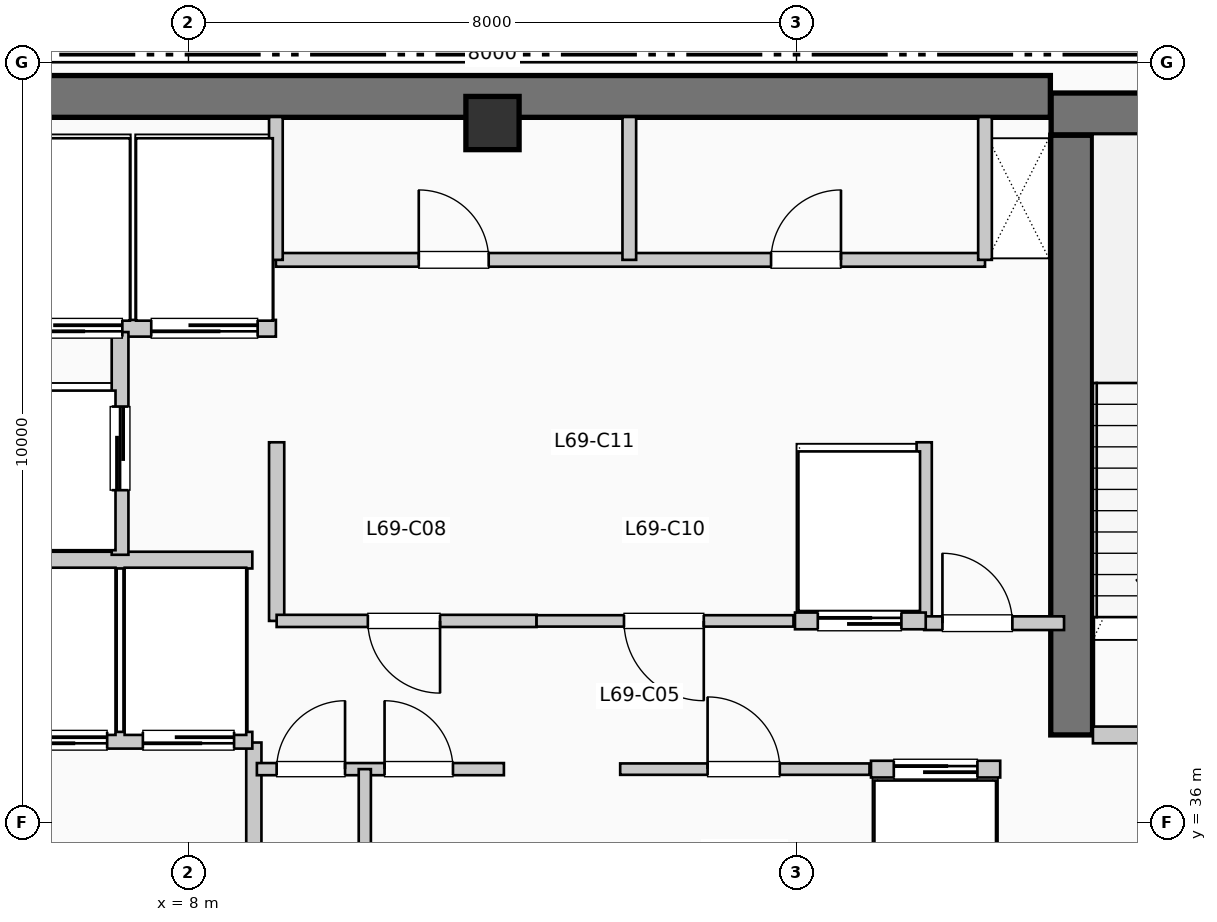
"""IFC4 building model, lengths in metres.
Left out: names, types, materials, properties, quantities, classifications, styles, units other than length and angle.
Written with IfcOpenShell. Run it as: python <this file> out.ifc"""

import sys

from ifc_helpers import new_model, si_unit, direction, frame, frame_2d, origin, origin_2d, place, context, subcontext, project, spatial, rectangle, extrude, element, fill, save


model = new_model("IFC4")
c1 = context("Model", 3, precision=1e-05, world=origin(), true_north=direction((0.0, 1.0)))
c2 = subcontext(c1, "Body", "Model", "MODEL_VIEW")
j1 = project(units=[si_unit("LENGTHUNIT", "METRE"), si_unit("PLANEANGLEUNIT", "RADIAN")], contexts=[c1])
p1 = place(None, origin())
s1 = spatial("IfcSite", under=j1, at=p1, CompositionType="ELEMENT")
p2 = place(p1, origin())
s2 = spatial("IfcBuilding", under=s1, at=p2, CompositionType="ELEMENT")
p3 = place(p2, frame((0.0, 0.0, 284.13)))
s3 = spatial("IfcBuildingStorey", under=s2, at=p3, CompositionType="ELEMENT", Elevation=284.13)
p4 = place(p3, frame((5.36, 45.55, 0.0), z_axis=(0.0, 0.0, 1.0), x_axis=(1.0, 0.0, 0.0)))
e1 = element("IfcWall", 1, at=p4, inside=s3, PredefinedType="SHEAR", context=c2, shape_type="SweptSolid", body=[
    extrude(rectangle(XDim=13.98, YDim=0.55, at=frame_2d((6.99, 0.0))), origin(), (0.0, 0.0, 1.0), 3.96),
])
p5 = place(p3, frame((19.62, 37.15, 0.0), z_axis=(0.0, 0.0, 1.0), x_axis=(0.0, 1.0, 0.0)))
e2 = element("IfcWall", 2, at=p5, inside=s3, PredefinedType="SHEAR", context=c2, shape_type="SweptSolid", body=[
    extrude(rectangle(XDim=7.89, YDim=0.55, at=frame_2d((3.945, 0.0))), origin(), (0.0, 0.0, 1.0), 3.96),
])
p6 = place(p3, frame((19.35, 45.32, 0.0), z_axis=(0.0, 0.0, 1.0), x_axis=(1.0, 0.0, 0.0)))
e3 = element("IfcWall", 3, at=p6, inside=s3, PredefinedType="SHEAR", context=c2, shape_type="SweptSolid", body=[
    extrude(rectangle(XDim=3.69, YDim=0.55, at=frame_2d((1.845, 0.0))), origin(), (0.0, 0.0, 1.0), 3.96),
])
p7 = place(p6, frame((1.15, 0.0, 1.05)))
e4 = element("IfcOpeningElement", 4, at=p7, cuts=e3, PredefinedType="OPENING", context=c2, shape_type="SweptSolid", body=[
    extrude(rectangle(XDim=1.4, YDim=1.8, at=frame_2d((0.7, 0.9))), frame((0.0, 0.285, 0.0), z_axis=(0.0, -1.0, 0.0), x_axis=(1.0, 0.0, 0.0)), (0.0, 0.0, 1.0), 0.57),
])
p8 = place(p3, frame((12.0, 45.2, 0.0), z_axis=(0.0, 0.0, 1.0), x_axis=(1.0, 0.0, 0.0)))
e5 = element("IfcColumn", 5, at=p8, inside=s3, PredefinedType="COLUMN", context=c2, shape_type="SweptSolid", body=[
    extrude(rectangle(XDim=0.7, YDim=0.7, at=origin_2d()), origin(), (0.0, 0.0, 1.0), 3.96),
])
p9 = place(p3, frame((8.86, 34.55, 0.0), z_axis=(0.0, 0.0, 1.0), x_axis=(0.0, 1.0, 0.0)))
e6 = element("IfcWall", 6, at=p9, inside=s3, PredefinedType="PARTITIONING", context=c2, shape_type="SweptSolid", body=[
    extrude(rectangle(XDim=2.5, YDim=0.2, at=frame_2d((1.25, 0.0))), origin(), (0.0, 0.0, 1.0), 3.74),
])
p10 = place(p3, frame((19.9, 37.15, 0.0), z_axis=(0.0, 0.0, 1.0), x_axis=(1.0, 0.0, 0.0)))
e7 = element("IfcWall", 7, at=p10, inside=s3, PredefinedType="PARTITIONING", context=c2, shape_type="SweptSolid", body=[
    extrude(rectangle(XDim=3.15, YDim=0.22, at=frame_2d((1.575, 0.0))), origin(), (0.0, 0.0, 1.0), 3.74),
])
p11 = place(p10, frame((2.05, 0.0, 0.0), z_axis=(0.0, 0.0, 1.0), x_axis=(-1.0, 0.0, 0.0)))
e8 = element("IfcOpeningElement", 8, at=p11, cuts=e7, PredefinedType="OPENING", context=c2, shape_type="SweptSolid", body=[
    extrude(rectangle(XDim=1.05, YDim=2.15, at=frame_2d((0.525, 1.075))), frame((0.0, 0.12, 0.0), z_axis=(0.0, -1.0, 0.0), x_axis=(1.0, 0.0, 0.0)), (0.0, 0.0, 1.0), 0.24),
])
p12 = place(p3, frame((5.38, 37.08, 0.0), z_axis=(0.0, 0.0, 1.0), x_axis=(1.0, 0.0, 0.0)))
e9 = element("IfcWall", 9, at=p12, inside=s3, PredefinedType="PARTITIONING", context=c2, shape_type="SweptSolid", body=[
    extrude(rectangle(XDim=3.46, YDim=0.22, at=frame_2d((1.73, 0.0))), origin(), (0.0, 0.0, 1.0), 3.74),
])
p13 = place(p12, frame((1.55, 0.0, 0.0), z_axis=(0.0, 0.0, 1.0), x_axis=(-1.0, 0.0, 0.0)))
e10 = element("IfcOpeningElement", 10, at=p13, cuts=e9, PredefinedType="OPENING", context=c2, shape_type="SweptSolid", body=[
    extrude(rectangle(XDim=1.2, YDim=2.2, at=frame_2d((0.6, 1.1))), frame((0.0, 0.12, 0.0), z_axis=(0.0, -1.0, 0.0), x_axis=(1.0, 0.0, 0.0)), (0.0, 0.0, 1.0), 0.24),
])
p14 = place(p12, frame((3.22, 0.0, 0.0), z_axis=(0.0, 0.0, 1.0), x_axis=(-1.0, 0.0, 0.0)))
e11 = element("IfcOpeningElement", 11, at=p14, cuts=e9, PredefinedType="OPENING", context=c2, shape_type="SweptSolid", body=[
    extrude(rectangle(XDim=1.2, YDim=2.2, at=frame_2d((0.6, 1.1))), frame((0.0, 0.12, 0.0), z_axis=(0.0, -1.0, 0.0), x_axis=(1.0, 0.0, 0.0)), (0.0, 0.0, 1.0), 0.24),
])
p15 = place(p3, frame((5.38, 39.45, 0.0), z_axis=(0.0, 0.0, 1.0), x_axis=(1.0, 0.0, 0.0)))
e12 = element("IfcWall", 12, at=p15, inside=s3, PredefinedType="PARTITIONING", context=c2, shape_type="SweptSolid", body=[
    extrude(rectangle(XDim=3.46, YDim=0.22, at=frame_2d((1.73, 0.0))), origin(), (0.0, 0.0, 1.0), 3.74),
])
p16 = place(p3, frame((5.38, 42.5, 0.0), z_axis=(0.0, 0.0, 1.0), x_axis=(1.0, 0.0, 0.0)))
e13 = element("IfcWall", 13, at=p16, inside=s3, PredefinedType="PARTITIONING", context=c2, shape_type="SweptSolid", body=[
    extrude(rectangle(XDim=3.77, YDim=0.22, at=frame_2d((1.885, 0.0))), origin(), (0.0, 0.0, 1.0), 3.74),
])
p17 = place(p16, frame((1.75, 0.0, 0.0), z_axis=(0.0, 0.0, 1.0), x_axis=(-1.0, 0.0, 0.0)))
e14 = element("IfcOpeningElement", 14, at=p17, cuts=e13, PredefinedType="OPENING", context=c2, shape_type="SweptSolid", body=[
    extrude(rectangle(XDim=1.4, YDim=2.2, at=frame_2d((0.7, 1.1))), frame((0.0, 0.12, 0.0), z_axis=(0.0, -1.0, 0.0), x_axis=(1.0, 0.0, 0.0)), (0.0, 0.0, 1.0), 0.24),
])
p18 = place(p16, frame((3.53, 0.0, 0.0), z_axis=(0.0, 0.0, 1.0), x_axis=(-1.0, 0.0, 0.0)))
e15 = element("IfcOpeningElement", 15, at=p18, cuts=e13, PredefinedType="OPENING", context=c2, shape_type="SweptSolid", body=[
    extrude(rectangle(XDim=1.4, YDim=2.2, at=frame_2d((0.7, 1.1))), frame((0.0, 0.12, 0.0), z_axis=(0.0, -1.0, 0.0), x_axis=(1.0, 0.0, 0.0)), (0.0, 0.0, 1.0), 0.24),
])
p19 = place(p3, frame((7.1, 39.52, 0.0), z_axis=(0.0, 0.0, 1.0), x_axis=(0.0, 1.0, 0.0)))
e16 = element("IfcWall", 16, at=p19, inside=s3, PredefinedType="PARTITIONING", context=c2, shape_type="SweptSolid", body=[
    extrude(rectangle(XDim=2.93, YDim=0.22, at=frame_2d((1.465, 0.0))), origin(), (0.0, 0.0, 1.0), 3.74),
])
p20 = place(p19, frame((0.85, 0.0, 0.0)))
e17 = element("IfcOpeningElement", 17, at=p20, cuts=e16, PredefinedType="OPENING", context=c2, shape_type="SweptSolid", body=[
    extrude(rectangle(XDim=1.1, YDim=2.2, at=frame_2d((0.55, 1.1))), frame((0.0, 0.12, 0.0), z_axis=(0.0, -1.0, 0.0), x_axis=(1.0, 0.0, 0.0)), (0.0, 0.0, 1.0), 0.24),
])
for number, where, z_axis, x_axis in (
    (18, (9.16, 38.65, 0.0), (0.0, 0.0, 1.0), (0.0, 1.0, 0.0)),
    (19, (17.68, 38.65, 0.0), (0.0, 0.0, 1.0), (0.0, 1.0, 0.0)),
):
    element("IfcWall", number, at=place(p3, frame(where, z_axis=z_axis, x_axis=x_axis)), inside=s3, PredefinedType="PARTITIONING", context=c2, shape_type="SweptSolid", body=[
        extrude(rectangle(XDim=2.35, YDim=0.2, at=frame_2d((1.175, 0.0))), origin(), (0.0, 0.0, 1.0), 3.74),
    ])
p21 = place(p3, frame((17.68, 38.62, 0.0), z_axis=(0.0, 0.0, 1.0), x_axis=(1.0, 0.0, 0.0)))
e20 = element("IfcWall", 20, at=p21, inside=s3, PredefinedType="PARTITIONING", context=c2, shape_type="SweptSolid", body=[
    extrude(rectangle(XDim=1.84, YDim=0.18, at=frame_2d((0.92, 0.0))), origin(), (0.0, 0.0, 1.0), 3.74),
])
p22 = place(p21, frame((0.24, 0.0, 0.0)))
e21 = element("IfcOpeningElement", 21, at=p22, cuts=e20, PredefinedType="OPENING", context=c2, shape_type="SweptSolid", body=[
    extrude(rectangle(XDim=0.92, YDim=2.1, at=frame_2d((0.46, 1.05))), frame((0.0, 0.1, 0.0), z_axis=(0.0, -1.0, 0.0), x_axis=(1.0, 0.0, 0.0)), (0.0, 0.0, 1.0), 0.2),
])
p23 = place(p3, frame((8.9, 36.7, 0.0), z_axis=(0.0, 0.0, 1.0), x_axis=(1.0, 0.0, 0.0)))
e22 = element("IfcWall", 22, at=p23, inside=s3, PredefinedType="PARTITIONING", context=c2, shape_type="SweptSolid", body=[
    extrude(rectangle(XDim=3.25, YDim=0.16, at=frame_2d((1.625, 0.0))), origin(), (0.0, 0.0, 1.0), 3.74),
])
p24 = place(p23, frame((0.26, 0.0, 0.0)))
e23 = element("IfcOpeningElement", 23, at=p24, cuts=e22, PredefinedType="OPENING", context=c2, shape_type="SweptSolid", body=[
    extrude(rectangle(XDim=0.9, YDim=2.15, at=frame_2d((0.45, 1.075))), frame((0.0, 0.09, 0.0), z_axis=(0.0, -1.0, 0.0), x_axis=(1.0, 0.0, 0.0)), (0.0, 0.0, 1.0), 0.18),
])
p25 = place(p23, frame((1.68, 0.0, 0.0)))
e24 = element("IfcOpeningElement", 24, at=p25, cuts=e22, PredefinedType="OPENING", context=c2, shape_type="SweptSolid", body=[
    extrude(rectangle(XDim=0.9, YDim=2.15, at=frame_2d((0.45, 1.075))), frame((0.0, 0.09, 0.0), z_axis=(0.0, -1.0, 0.0), x_axis=(1.0, 0.0, 0.0)), (0.0, 0.0, 1.0), 0.18),
])
p26 = place(p3, frame((10.32, 34.55, 0.0), z_axis=(0.0, 0.0, 1.0), x_axis=(0.0, 1.0, 0.0)))
e25 = element("IfcWall", 25, at=p26, inside=s3, PredefinedType="PARTITIONING", context=c2, shape_type="SweptSolid", body=[
    extrude(rectangle(XDim=2.15, YDim=0.16, at=frame_2d((1.075, 0.0))), origin(), (0.0, 0.0, 1.0), 3.74),
])
p27 = place(p3, frame((9.16, 38.65, 0.0), z_axis=(0.0, 0.0, 1.0), x_axis=(1.0, 0.0, 0.0)))
e26 = element("IfcWall", 26, at=p27, inside=s3, PredefinedType="PARTITIONING", context=c2, shape_type="SweptSolid", body=[
    extrude(rectangle(XDim=3.42, YDim=0.16, at=frame_2d((1.71, 0.0))), origin(), (0.0, 0.0, 1.0), 3.74),
])
p28 = place(p27, frame((2.15, 0.0, 0.0), z_axis=(0.0, 0.0, 1.0), x_axis=(-1.0, 0.0, 0.0)))
e27 = element("IfcOpeningElement", 27, at=p28, cuts=e26, PredefinedType="OPENING", context=c2, shape_type="SweptSolid", body=[
    extrude(rectangle(XDim=0.95, YDim=2.15, at=frame_2d((0.475, 1.075))), frame((0.0, 0.09, 0.0), z_axis=(0.0, -1.0, 0.0), x_axis=(1.0, 0.0, 0.0)), (0.0, 0.0, 1.0), 0.18),
])
p29 = place(p3, frame((13.68, 36.7, 0.0), z_axis=(0.0, 0.0, 1.0), x_axis=(1.0, 0.0, 0.0)))
e28 = element("IfcWall", 28, at=p29, inside=s3, PredefinedType="PARTITIONING", context=c2, shape_type="SweptSolid", body=[
    extrude(rectangle(XDim=3.28, YDim=0.15, at=frame_2d((1.64, 0.0))), origin(), (0.0, 0.0, 1.0), 3.74),
])
p30 = place(p29, frame((1.15, 0.0, 0.0)))
e29 = element("IfcOpeningElement", 29, at=p30, cuts=e28, PredefinedType="OPENING", context=c2, shape_type="SweptSolid", body=[
    extrude(rectangle(XDim=0.95, YDim=2.15, at=frame_2d((0.475, 1.075))), frame((0.0, 0.085, 0.0), z_axis=(0.0, -1.0, 0.0), x_axis=(1.0, 0.0, 0.0)), (0.0, 0.0, 1.0), 0.17),
])
p31 = place(p3, frame((12.58, 38.65, 0.0), z_axis=(0.0, 0.0, 1.0), x_axis=(1.0, 0.0, 0.0)))
e30 = element("IfcWall", 30, at=p31, inside=s3, PredefinedType="PARTITIONING", context=c2, shape_type="SweptSolid", body=[
    extrude(rectangle(XDim=3.38, YDim=0.15, at=frame_2d((1.69, 0.0))), origin(), (0.0, 0.0, 1.0), 3.74),
])
p32 = place(p31, frame((2.2, 0.0, 0.0), z_axis=(0.0, 0.0, 1.0), x_axis=(-1.0, 0.0, 0.0)))
e31 = element("IfcOpeningElement", 31, at=p32, cuts=e30, PredefinedType="OPENING", context=c2, shape_type="SweptSolid", body=[
    extrude(rectangle(XDim=1.05, YDim=2.15, at=frame_2d((0.525, 1.075))), frame((0.0, 0.085, 0.0), z_axis=(0.0, -1.0, 0.0), x_axis=(1.0, 0.0, 0.0)), (0.0, 0.0, 1.0), 0.17),
])
p33 = place(p3, frame((16.98, 36.7, 0.0), z_axis=(0.0, 0.0, 1.0), x_axis=(1.0, 0.0, 0.0)))
e32 = element("IfcWall", 32, at=p33, inside=s3, PredefinedType="PARTITIONING", context=c2, shape_type="SweptSolid", body=[
    extrude(rectangle(XDim=1.7, YDim=0.22, at=frame_2d((0.85, 0.0))), origin(), (0.0, 0.0, 1.0), 3.74),
])
p34 = place(p33, frame((0.3, 0.0, 0.0)))
e33 = element("IfcOpeningElement", 33, at=p34, cuts=e32, PredefinedType="OPENING", context=c2, shape_type="SweptSolid", body=[
    extrude(rectangle(XDim=1.1, YDim=2.2, at=frame_2d((0.55, 1.1))), frame((0.0, 0.12, 0.0), z_axis=(0.0, -1.0, 0.0), x_axis=(1.0, 0.0, 0.0)), (0.0, 0.0, 1.0), 0.24),
])
p35 = place(p3, frame((15.98, 38.65, 0.0), z_axis=(0.0, 0.0, 1.0), x_axis=(1.0, 0.0, 0.0)))
e34 = element("IfcWall", 34, at=p35, inside=s3, PredefinedType="PARTITIONING", context=c2, shape_type="SweptSolid", body=[
    extrude(rectangle(XDim=1.72, YDim=0.22, at=frame_2d((0.86, 0.0))), origin(), (0.0, 0.0, 1.0), 3.74),
])
p36 = place(p35, frame((0.3, 0.0, 0.0)))
e35 = element("IfcOpeningElement", 35, at=p36, cuts=e34, PredefinedType="OPENING", context=c2, shape_type="SweptSolid", body=[
    extrude(rectangle(XDim=1.1, YDim=2.2, at=frame_2d((0.55, 1.1))), frame((0.0, 0.12, 0.0), z_axis=(0.0, -1.0, 0.0), x_axis=(1.0, 0.0, 0.0)), (0.0, 0.0, 1.0), 0.24),
])
p37 = place(p3, frame((9.15, 43.4, 0.0), z_axis=(0.0, 0.0, 1.0), x_axis=(1.0, 0.0, 0.0)))
e36 = element("IfcWall", 36, at=p37, inside=s3, PredefinedType="PLUMBINGWALL", context=c2, shape_type="SweptSolid", body=[
    extrude(rectangle(XDim=9.33, YDim=0.18, at=frame_2d((4.665, 0.0))), origin(), (0.0, 0.0, 1.0), 3.74),
])
p38 = place(p37, frame((1.88, 0.0, 0.0)))
e37 = element("IfcOpeningElement", 37, at=p38, cuts=e36, PredefinedType="OPENING", context=c2, shape_type="SweptSolid", body=[
    extrude(rectangle(XDim=0.92, YDim=2.1, at=frame_2d((0.46, 1.05))), frame((0.0, 0.1, 0.0), z_axis=(0.0, -1.0, 0.0), x_axis=(1.0, 0.0, 0.0)), (0.0, 0.0, 1.0), 0.2),
])
p39 = place(p37, frame((6.515, 0.0, 0.0)))
e38 = element("IfcOpeningElement", 38, at=p39, cuts=e36, PredefinedType="OPENING", context=c2, shape_type="SweptSolid", body=[
    extrude(rectangle(XDim=0.92, YDim=2.1, at=frame_2d((0.46, 1.05))), frame((0.0, 0.1, 0.0), z_axis=(0.0, -1.0, 0.0), x_axis=(1.0, 0.0, 0.0)), (0.0, 0.0, 1.0), 0.2),
])
for number, where, z_axis, x_axis in (
    (39, (9.15, 43.4, 0.0), (0.0, 0.0, 1.0), (0.0, 1.0, 0.0)),
    (40, (18.48, 43.4, 0.0), (0.0, 0.0, 1.0), (0.0, 1.0, 0.0)),
    (41, (13.8, 43.4, 0.0), (0.0, 0.0, 1.0), (0.0, 1.0, 0.0)),
):
    element("IfcWall", number, at=place(p3, frame(where, z_axis=z_axis, x_axis=x_axis)), inside=s3, PredefinedType="PLUMBINGWALL", context=c2, shape_type="SweptSolid", body=[
        extrude(rectangle(XDim=1.88, YDim=0.18, at=frame_2d((0.94, 0.0))), origin(), (0.0, 0.0, 1.0), 3.74),
    ])
p40 = place(p13, origin())
e42 = element("IfcDoor", 42, at=p40, inside=s3, OperationType="SLIDING_TO_RIGHT", PredefinedType="DOOR", context=c2, shape_type="SweptSolid", body=[
    extrude(rectangle(XDim=1.2, YDim=2.2, at=frame_2d((0.6, 1.1))), frame((0.0, 0.025, 0.0), z_axis=(0.0, -1.0, 0.0), x_axis=(1.0, 0.0, 0.0)), (0.0, 0.0, 1.0), 0.05),
])
fill(e10, e42)
p41 = place(p14, origin())
e43 = element("IfcDoor", 43, at=p41, inside=s3, OperationType="SLIDING_TO_RIGHT", PredefinedType="DOOR", context=c2, shape_type="SweptSolid", body=[
    extrude(rectangle(XDim=1.2, YDim=2.2, at=frame_2d((0.6, 1.1))), frame((0.0, 0.025, 0.0), z_axis=(0.0, -1.0, 0.0), x_axis=(1.0, 0.0, 0.0)), (0.0, 0.0, 1.0), 0.05),
])
fill(e11, e43)
p42 = place(p17, origin())
e44 = element("IfcDoor", 44, at=p42, inside=s3, OperationType="SLIDING_TO_LEFT", PredefinedType="DOOR", context=c2, shape_type="SweptSolid", body=[
    extrude(rectangle(XDim=1.4, YDim=2.2, at=frame_2d((0.7, 1.1))), frame((0.0, 0.025, 0.0), z_axis=(0.0, -1.0, 0.0), x_axis=(1.0, 0.0, 0.0)), (0.0, 0.0, 1.0), 0.05),
])
fill(e14, e44)
p43 = place(p18, origin())
e45 = element("IfcDoor", 45, at=p43, inside=s3, OperationType="SLIDING_TO_LEFT", PredefinedType="DOOR", context=c2, shape_type="SweptSolid", body=[
    extrude(rectangle(XDim=1.4, YDim=2.2, at=frame_2d((0.7, 1.1))), frame((0.0, 0.025, 0.0), z_axis=(0.0, -1.0, 0.0), x_axis=(1.0, 0.0, 0.0)), (0.0, 0.0, 1.0), 0.05),
])
fill(e15, e45)
p44 = place(p20, origin())
e46 = element("IfcDoor", 46, at=p44, inside=s3, OperationType="SLIDING_TO_LEFT", PredefinedType="DOOR", context=c2, shape_type="SweptSolid", body=[
    extrude(rectangle(XDim=1.1, YDim=2.2, at=frame_2d((0.55, 1.1))), frame((0.0, 0.025, 0.0), z_axis=(0.0, -1.0, 0.0), x_axis=(1.0, 0.0, 0.0)), (0.0, 0.0, 1.0), 0.05),
])
fill(e17, e46)
p45 = place(p22, origin())
e47 = element("IfcDoor", 47, at=p45, inside=s3, OperationType="SINGLE_SWING_LEFT", PredefinedType="DOOR", context=c2, shape_type="SweptSolid", body=[
    extrude(rectangle(XDim=0.92, YDim=2.1, at=frame_2d((0.46, 1.05))), frame((0.0, 0.025, 0.0), z_axis=(0.0, -1.0, 0.0), x_axis=(1.0, 0.0, 0.0)), (0.0, 0.0, 1.0), 0.05),
])
fill(e21, e47)
p46 = place(p24, origin())
e48 = element("IfcDoor", 48, at=p46, inside=s3, OperationType="SINGLE_SWING_RIGHT", PredefinedType="DOOR", context=c2, shape_type="SweptSolid", body=[
    extrude(rectangle(XDim=0.9, YDim=2.15, at=frame_2d((0.45, 1.075))), frame((0.0, 0.025, 0.0), z_axis=(0.0, -1.0, 0.0), x_axis=(1.0, 0.0, 0.0)), (0.0, 0.0, 1.0), 0.05),
])
fill(e23, e48)
p47 = place(p25, origin())
e49 = element("IfcDoor", 49, at=p47, inside=s3, OperationType="SINGLE_SWING_LEFT", PredefinedType="DOOR", context=c2, shape_type="SweptSolid", body=[
    extrude(rectangle(XDim=0.9, YDim=2.15, at=frame_2d((0.45, 1.075))), frame((0.0, 0.025, 0.0), z_axis=(0.0, -1.0, 0.0), x_axis=(1.0, 0.0, 0.0)), (0.0, 0.0, 1.0), 0.05),
])
fill(e24, e49)
p48 = place(p28, origin())
e50 = element("IfcDoor", 50, at=p48, inside=s3, OperationType="SINGLE_SWING_RIGHT", PredefinedType="DOOR", context=c2, shape_type="SweptSolid", body=[
    extrude(rectangle(XDim=0.95, YDim=2.15, at=frame_2d((0.475, 1.075))), frame((0.0, 0.025, 0.0), z_axis=(0.0, -1.0, 0.0), x_axis=(1.0, 0.0, 0.0)), (0.0, 0.0, 1.0), 0.05),
])
fill(e27, e50)
p49 = place(p30, origin())
e51 = element("IfcDoor", 51, at=p49, inside=s3, OperationType="SINGLE_SWING_LEFT", PredefinedType="DOOR", context=c2, shape_type="SweptSolid", body=[
    extrude(rectangle(XDim=0.95, YDim=2.15, at=frame_2d((0.475, 1.075))), frame((0.0, 0.025, 0.0), z_axis=(0.0, -1.0, 0.0), x_axis=(1.0, 0.0, 0.0)), (0.0, 0.0, 1.0), 0.05),
])
fill(e29, e51)
p50 = place(p32, origin())
e52 = element("IfcDoor", 52, at=p50, inside=s3, OperationType="SINGLE_SWING_RIGHT", PredefinedType="DOOR", context=c2, shape_type="SweptSolid", body=[
    extrude(rectangle(XDim=1.05, YDim=2.15, at=frame_2d((0.525, 1.075))), frame((0.0, 0.025, 0.0), z_axis=(0.0, -1.0, 0.0), x_axis=(1.0, 0.0, 0.0)), (0.0, 0.0, 1.0), 0.05),
])
fill(e31, e52)
p51 = place(p34, origin())
e53 = element("IfcDoor", 53, at=p51, inside=s3, OperationType="SLIDING_TO_LEFT", PredefinedType="DOOR", context=c2, shape_type="SweptSolid", body=[
    extrude(rectangle(XDim=1.1, YDim=2.2, at=frame_2d((0.55, 1.1))), frame((0.0, 0.025, 0.0), z_axis=(0.0, -1.0, 0.0), x_axis=(1.0, 0.0, 0.0)), (0.0, 0.0, 1.0), 0.05),
])
fill(e33, e53)
p52 = place(p36, origin())
e54 = element("IfcDoor", 54, at=p52, inside=s3, OperationType="SLIDING_TO_LEFT", PredefinedType="DOOR", context=c2, shape_type="SweptSolid", body=[
    extrude(rectangle(XDim=1.1, YDim=2.2, at=frame_2d((0.55, 1.1))), frame((0.0, 0.025, 0.0), z_axis=(0.0, -1.0, 0.0), x_axis=(1.0, 0.0, 0.0)), (0.0, 0.0, 1.0), 0.05),
])
fill(e35, e54)
p53 = place(p38, origin())
e55 = element("IfcDoor", 55, at=p53, inside=s3, OperationType="SINGLE_SWING_LEFT", PredefinedType="DOOR", context=c2, shape_type="SweptSolid", body=[
    extrude(rectangle(XDim=0.92, YDim=2.1, at=frame_2d((0.46, 1.05))), frame((0.0, 0.025, 0.0), z_axis=(0.0, -1.0, 0.0), x_axis=(1.0, 0.0, 0.0)), (0.0, 0.0, 1.0), 0.05),
])
fill(e37, e55)
p54 = place(p39, origin())
e56 = element("IfcDoor", 56, at=p54, inside=s3, OperationType="SINGLE_SWING_RIGHT", PredefinedType="DOOR", context=c2, shape_type="SweptSolid", body=[
    extrude(rectangle(XDim=0.92, YDim=2.1, at=frame_2d((0.46, 1.05))), frame((0.0, 0.025, 0.0), z_axis=(0.0, -1.0, 0.0), x_axis=(1.0, 0.0, 0.0)), (0.0, 0.0, 1.0), 0.05),
])
fill(e38, e56)
save(model, sys.argv[1])
